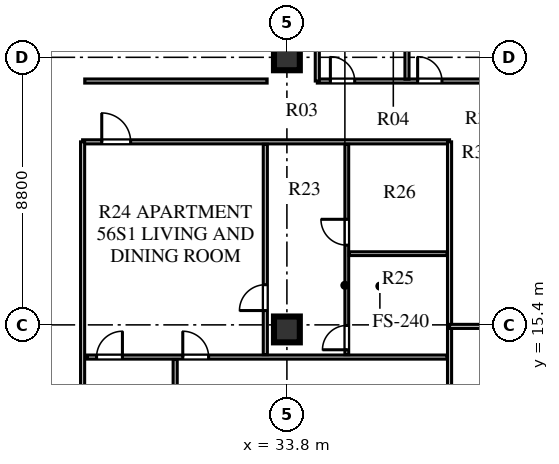
"""IFC4 building model, lengths in metres.
Left out: names, types, materials, properties, quantities, classifications, styles, units other than length and angle.
Written with IfcOpenShell. Run it as: python <this file> out.ifc"""

import sys

from ifc_helpers import new_model, si_unit, direction, frame, frame_2d, origin, origin_2d, place, context, subcontext, project, spatial, rectangle, extrude, element, fill, save


model = new_model("IFC4")
c1 = context("Model", 3, precision=1e-05, world=origin(), true_north=direction((0.0, 1.0)))
c2 = subcontext(c1, "Body", "Model", "MODEL_VIEW")
j1 = project(units=[si_unit("LENGTHUNIT", "METRE"), si_unit("PLANEANGLEUNIT", "RADIAN")], contexts=[c1])
p1 = place(None, origin())
s1 = spatial("IfcSite", under=j1, at=p1, CompositionType="ELEMENT")
p2 = place(p1, origin())
s2 = spatial("IfcBuilding", under=s1, at=p2, CompositionType="ELEMENT")
p3 = place(p2, frame((0.0, 0.0, 229.7)))
s3 = spatial("IfcBuildingStorey", under=s2, at=p3, CompositionType="ELEMENT", Elevation=229.7)
for number, where, z_axis, x_axis in (
    (1, (33.8, 15.25, 0.0), (0.0, 0.0, 1.0), (1.0, 0.0, 0.0)),
    (2, (33.8, 24.2, 0.0), (0.0, 0.0, 1.0), (1.0, 0.0, 0.0)),
):
    element("IfcColumn", number, at=place(p3, frame(where, z_axis=z_axis, x_axis=x_axis)), inside=s3, PredefinedType="COLUMN", context=c2, shape_type="SweptSolid", body=[
        extrude(rectangle(XDim=0.85, YDim=0.85, at=origin_2d()), origin(), (0.0, 0.0, 1.0), 3.66),
    ])
p4 = place(p3, frame((27.08, 21.42, 0.0), z_axis=(0.0, 0.0, 1.0), x_axis=(1.0, 0.0, 0.0)))
e3 = element("IfcWall", 3, at=p4, inside=s3, PredefinedType="PARTITIONING", context=c2, shape_type="SweptSolid", body=[
    extrude(rectangle(XDim=12.07, YDim=0.135, at=frame_2d((6.035, 0.0))), origin(), (0.0, 0.0, 1.0), 3.31),
])
p5 = place(p4, frame((0.63, 0.0, 0.0)))
e4 = element("IfcOpeningElement", 4, at=p5, cuts=e3, PredefinedType="OPENING", context=c2, shape_type="SweptSolid", body=[
    extrude(rectangle(XDim=0.95, YDim=2.1, at=frame_2d((0.475, 1.05))), frame((0.0, 0.078, 0.0), z_axis=(0.0, -1.0, 0.0), x_axis=(1.0, 0.0, 0.0)), (0.0, 0.0, 1.0), 0.155),
])
p6 = place(p3, frame((27.08, 7.88, 0.0), z_axis=(0.0, 0.0, 1.0), x_axis=(0.0, 1.0, 0.0)))
e5 = element("IfcWall", 5, at=p6, inside=s3, PredefinedType="PARTITIONING", context=c2, shape_type="SweptSolid", body=[
    extrude(rectangle(XDim=13.54, YDim=0.135, at=frame_2d((6.77, 0.0))), origin(), (0.0, 0.0, 1.0), 3.66),
])
p7 = place(p3, frame((27.15, 23.42, 0.0), z_axis=(0.0, 0.0, 1.0), x_axis=(1.0, 0.0, 0.0)))
e6 = element("IfcWall", 6, at=p7, inside=s3, PredefinedType="PARTITIONING", context=c2, shape_type="SweptSolid", body=[
    extrude(rectangle(XDim=6.0, YDim=0.135, at=frame_2d((3.0, 0.0))), origin(), (0.0, 0.0, 1.0), 3.66),
])
p8 = place(p3, frame((39.15, 7.88, 0.0), z_axis=(0.0, 0.0, 1.0), x_axis=(0.0, 1.0, 0.0)))
e7 = element("IfcWall", 7, at=p8, inside=s3, PredefinedType="PARTITIONING", context=c2, shape_type="SweptSolid", body=[
    extrude(rectangle(XDim=13.54, YDim=0.135, at=frame_2d((6.77, 0.0))), origin(), (0.0, 0.0, 1.0), 3.66),
])
p9 = place(p3, frame((27.24, 14.341, 0.0), z_axis=(0.0, 0.0, 1.0), x_axis=(1.0, 0.0, 0.0)))
e8 = element("IfcWall", 8, at=p9, inside=s3, PredefinedType="PARTITIONING", context=c2, shape_type="SweptSolid", body=[
    extrude(rectangle(XDim=11.83, YDim=0.135, at=frame_2d((5.915, 0.0))), origin(), (0.0, 0.0, 1.0), 3.66),
])
p10 = place(p9, frame((0.3, 0.0, 0.0)))
e9 = element("IfcOpeningElement", 9, at=p10, cuts=e8, PredefinedType="OPENING", context=c2, shape_type="SweptSolid", body=[
    extrude(rectangle(XDim=0.85, YDim=2.08, at=frame_2d((0.425, 1.04))), frame((0.0, 0.078, 0.0), z_axis=(0.0, -1.0, 0.0), x_axis=(1.0, 0.0, 0.0)), (0.0, 0.0, 1.0), 0.155),
])
p11 = place(p9, frame((3.135, 0.0, 0.0)))
e10 = element("IfcOpeningElement", 10, at=p11, cuts=e8, PredefinedType="OPENING", context=c2, shape_type="SweptSolid", body=[
    extrude(rectangle(XDim=0.85, YDim=2.08, at=frame_2d((0.425, 1.04))), frame((0.0, 0.078, 0.0), z_axis=(0.0, -1.0, 0.0), x_axis=(1.0, 0.0, 0.0)), (0.0, 0.0, 1.0), 0.155),
])
p12 = place(p3, frame((35.77, 14.421, 0.0), z_axis=(0.0, 0.0, 1.0), x_axis=(0.0, 1.0, 0.0)))
e11 = element("IfcWall", 11, at=p12, inside=s3, PredefinedType="PLUMBINGWALL", context=c2, shape_type="SweptSolid", body=[
    extrude(rectangle(XDim=6.919, YDim=0.125, at=frame_2d((3.459, 0.0))), origin(), (0.0, 0.0, 1.0), 3.66),
])
p13 = place(p12, frame((0.16, 0.0, 0.0)))
e12 = element("IfcOpeningElement", 12, at=p13, cuts=e11, PredefinedType="OPENING", context=c2, shape_type="SweptSolid", body=[
    extrude(rectangle(XDim=0.8, YDim=2.05, at=frame_2d((0.4, 1.025))), frame((0.0, 0.073, 0.0), z_axis=(0.0, -1.0, 0.0), x_axis=(1.0, 0.0, 0.0)), (0.0, 0.0, 1.0), 0.145),
])
p14 = place(p12, frame((3.601, 0.0, 0.0)))
e13 = element("IfcOpeningElement", 13, at=p14, cuts=e11, PredefinedType="OPENING", context=c2, shape_type="SweptSolid", body=[
    extrude(rectangle(XDim=0.85, YDim=2.08, at=frame_2d((0.425, 1.04))), frame((0.0, 0.073, 0.0), z_axis=(0.0, -1.0, 0.0), x_axis=(1.0, 0.0, 0.0)), (0.0, 0.0, 1.0), 0.145),
])
p15 = place(p3, frame((35.85, 17.742, 0.0), z_axis=(0.0, 0.0, 1.0), x_axis=(1.0, 0.0, 0.0)))
e14 = element("IfcWall", 14, at=p15, inside=s3, PredefinedType="PLUMBINGWALL", context=c2, shape_type="SweptSolid", body=[
    extrude(rectangle(XDim=3.22, YDim=0.125, at=frame_2d((1.61, 0.0))), origin(), (0.0, 0.0, 1.0), 3.66),
])
p16 = place(p3, frame((33.09, 14.421, 0.0), z_axis=(0.0, 0.0, 1.0), x_axis=(0.0, 1.0, 0.0)))
e15 = element("IfcWall", 15, at=p16, inside=s3, PredefinedType="PARTITIONING", context=c2, shape_type="SweptSolid", body=[
    extrude(rectangle(XDim=6.919, YDim=0.135, at=frame_2d((3.459, 0.0))), origin(), (0.0, 0.0, 1.0), 3.66),
])
p17 = place(p16, frame((1.45, 0.0, 0.0)))
e16 = element("IfcOpeningElement", 16, at=p17, cuts=e15, PredefinedType="OPENING", context=c2, shape_type="SweptSolid", body=[
    extrude(rectangle(XDim=0.85, YDim=2.08, at=frame_2d((0.425, 1.04))), frame((0.0, 0.078, 0.0), z_axis=(0.0, -1.0, 0.0), x_axis=(1.0, 0.0, 0.0)), (0.0, 0.0, 1.0), 0.155),
])
p18 = place(p3, frame((30.125, 7.88, 0.0), z_axis=(0.0, 0.0, 1.0), x_axis=(0.0, 1.0, 0.0)))
e17 = element("IfcWall", 17, at=p18, inside=s3, PredefinedType="PARTITIONING", context=c2, shape_type="SweptSolid", body=[
    extrude(rectangle(XDim=6.381, YDim=0.135, at=frame_2d((3.19, 0.0))), origin(), (0.0, 0.0, 1.0), 3.66),
])
p19 = place(p3, frame((39.15, 15.35, 0.0), z_axis=(0.0, 0.0, 1.0), x_axis=(1.0, 0.0, 0.0)))
e18 = element("IfcWall", 18, at=p19, inside=s3, PredefinedType="PARTITIONING", context=c2, shape_type="SweptSolid", body=[
    extrude(rectangle(XDim=11.37, YDim=0.135, at=frame_2d((5.685, 0.0))), origin(), (0.0, 0.0, 1.0), 3.06),
])
p20 = place(p3, frame((34.8, 23.42, 0.0), z_axis=(0.0, 0.0, 1.0), x_axis=(1.0, 0.0, 0.0)))
e19 = element("IfcWall", 19, at=p20, inside=s3, PredefinedType="PARTITIONING", context=c2, shape_type="SweptSolid", body=[
    extrude(rectangle(XDim=5.9, YDim=0.135, at=frame_2d((2.95, 0.0))), origin(), (0.0, 0.0, 1.0), 3.66),
])
p21 = place(p20, frame((0.43, 0.0, 0.0)))
e20 = element("IfcOpeningElement", 20, at=p21, cuts=e19, PredefinedType="OPENING", context=c2, shape_type="SweptSolid", body=[
    extrude(rectangle(XDim=0.8, YDim=2.05, at=frame_2d((0.4, 1.025))), frame((0.0, 0.078, 0.0), z_axis=(0.0, -1.0, 0.0), x_axis=(1.0, 0.0, 0.0)), (0.0, 0.0, 1.0), 0.155),
])
p22 = place(p20, frame((3.3, 0.0, 0.0)))
e21 = element("IfcOpeningElement", 21, at=p22, cuts=e19, PredefinedType="OPENING", context=c2, shape_type="SweptSolid", body=[
    extrude(rectangle(XDim=0.8, YDim=2.05, at=frame_2d((0.4, 1.025))), frame((0.0, 0.078, 0.0), z_axis=(0.0, -1.0, 0.0), x_axis=(1.0, 0.0, 0.0)), (0.0, 0.0, 1.0), 0.155),
])
p23 = place(p3, frame((34.8, 23.42, 0.0), z_axis=(0.0, 0.0, 1.0), x_axis=(0.0, 1.0, 0.0)))
e22 = element("IfcWall", 22, at=p23, inside=s3, PredefinedType="PARTITIONING", context=c2, shape_type="SweptSolid", body=[
    extrude(rectangle(XDim=3.78, YDim=0.135, at=frame_2d((1.89, 0.0))), origin(), (0.0, 0.0, 1.0), 3.66),
])
p24 = place(p3, frame((37.75, 23.48, 0.0), z_axis=(0.0, 0.0, 1.0), x_axis=(0.0, 1.0, 0.0)))
e23 = element("IfcWall", 23, at=p24, inside=s3, PredefinedType="PARTITIONING", context=c2, shape_type="SweptSolid", body=[
    extrude(rectangle(XDim=3.66, YDim=0.135, at=frame_2d((1.83, 0.0))), origin(), (0.0, 0.0, 1.0), 3.66),
])
p25 = place(p17, origin())
e24 = element("IfcDoor", 24, at=p25, inside=s3, OperationType="SINGLE_SWING_LEFT", PredefinedType="DOOR", context=c2, shape_type="SweptSolid", body=[
    extrude(rectangle(XDim=0.85, YDim=2.08, at=frame_2d((0.425, 1.04))), frame((0.0, 0.025, 0.0), z_axis=(0.0, -1.0, 0.0), x_axis=(1.0, 0.0, 0.0)), (0.0, 0.0, 1.0), 0.05),
])
fill(e16, e24)
p26 = place(p13, origin())
e25 = element("IfcDoor", 25, at=p26, inside=s3, OperationType="SINGLE_SWING_LEFT", PredefinedType="DOOR", context=c2, shape_type="SweptSolid", body=[
    extrude(rectangle(XDim=0.8, YDim=2.05, at=frame_2d((0.4, 1.025))), frame((0.0, 0.025, 0.0), z_axis=(0.0, -1.0, 0.0), x_axis=(1.0, 0.0, 0.0)), (0.0, 0.0, 1.0), 0.05),
])
fill(e12, e25)
p27 = place(p14, origin())
e26 = element("IfcDoor", 26, at=p27, inside=s3, OperationType="SINGLE_SWING_RIGHT", PredefinedType="DOOR", context=c2, shape_type="SweptSolid", body=[
    extrude(rectangle(XDim=0.85, YDim=2.08, at=frame_2d((0.425, 1.04))), frame((0.0, 0.025, 0.0), z_axis=(0.0, -1.0, 0.0), x_axis=(1.0, 0.0, 0.0)), (0.0, 0.0, 1.0), 0.05),
])
fill(e13, e26)
p28 = place(p10, frame((0.85, 0.0, 0.0), z_axis=(0.0, 0.0, 1.0), x_axis=(-1.0, 0.0, 0.0)))
e27 = element("IfcDoor", 27, at=p28, inside=s3, OperationType="SINGLE_SWING_LEFT", PredefinedType="DOOR", context=c2, shape_type="SweptSolid", body=[
    extrude(rectangle(XDim=0.85, YDim=2.08, at=frame_2d((0.425, 1.04))), frame((0.0, 0.025, 0.0), z_axis=(0.0, -1.0, 0.0), x_axis=(1.0, 0.0, 0.0)), (0.0, 0.0, 1.0), 0.05),
])
fill(e9, e27)
p29 = place(p11, frame((0.85, 0.0, 0.0), z_axis=(0.0, 0.0, 1.0), x_axis=(-1.0, 0.0, 0.0)))
e28 = element("IfcDoor", 28, at=p29, inside=s3, OperationType="SINGLE_SWING_RIGHT", PredefinedType="DOOR", context=c2, shape_type="SweptSolid", body=[
    extrude(rectangle(XDim=0.85, YDim=2.08, at=frame_2d((0.425, 1.04))), frame((0.0, 0.025, 0.0), z_axis=(0.0, -1.0, 0.0), x_axis=(1.0, 0.0, 0.0)), (0.0, 0.0, 1.0), 0.05),
])
fill(e10, e28)
p30 = place(p5, frame((0.95, 0.0, 0.0), z_axis=(0.0, 0.0, 1.0), x_axis=(-1.0, 0.0, 0.0)))
e29 = element("IfcDoor", 29, at=p30, inside=s3, OperationType="SINGLE_SWING_RIGHT", PredefinedType="DOOR", context=c2, shape_type="SweptSolid", body=[
    extrude(rectangle(XDim=0.95, YDim=2.1, at=frame_2d((0.475, 1.05))), frame((0.0, 0.025, 0.0), z_axis=(0.0, -1.0, 0.0), x_axis=(1.0, 0.0, 0.0)), (0.0, 0.0, 1.0), 0.05),
])
fill(e4, e29)
p31 = place(p21, origin())
e30 = element("IfcDoor", 30, at=p31, inside=s3, OperationType="SINGLE_SWING_LEFT", PredefinedType="DOOR", context=c2, shape_type="SweptSolid", body=[
    extrude(rectangle(XDim=0.8, YDim=2.05, at=frame_2d((0.4, 1.025))), frame((0.0, 0.025, 0.0), z_axis=(0.0, -1.0, 0.0), x_axis=(1.0, 0.0, 0.0)), (0.0, 0.0, 1.0), 0.05),
])
fill(e20, e30)
p32 = place(p22, origin())
e31 = element("IfcDoor", 31, at=p32, inside=s3, OperationType="SINGLE_SWING_LEFT", PredefinedType="DOOR", context=c2, shape_type="SweptSolid", body=[
    extrude(rectangle(XDim=0.8, YDim=2.05, at=frame_2d((0.4, 1.025))), frame((0.0, 0.025, 0.0), z_axis=(0.0, -1.0, 0.0), x_axis=(1.0, 0.0, 0.0)), (0.0, 0.0, 1.0), 0.05),
])
fill(e21, e31)
save(model, sys.argv[1])
